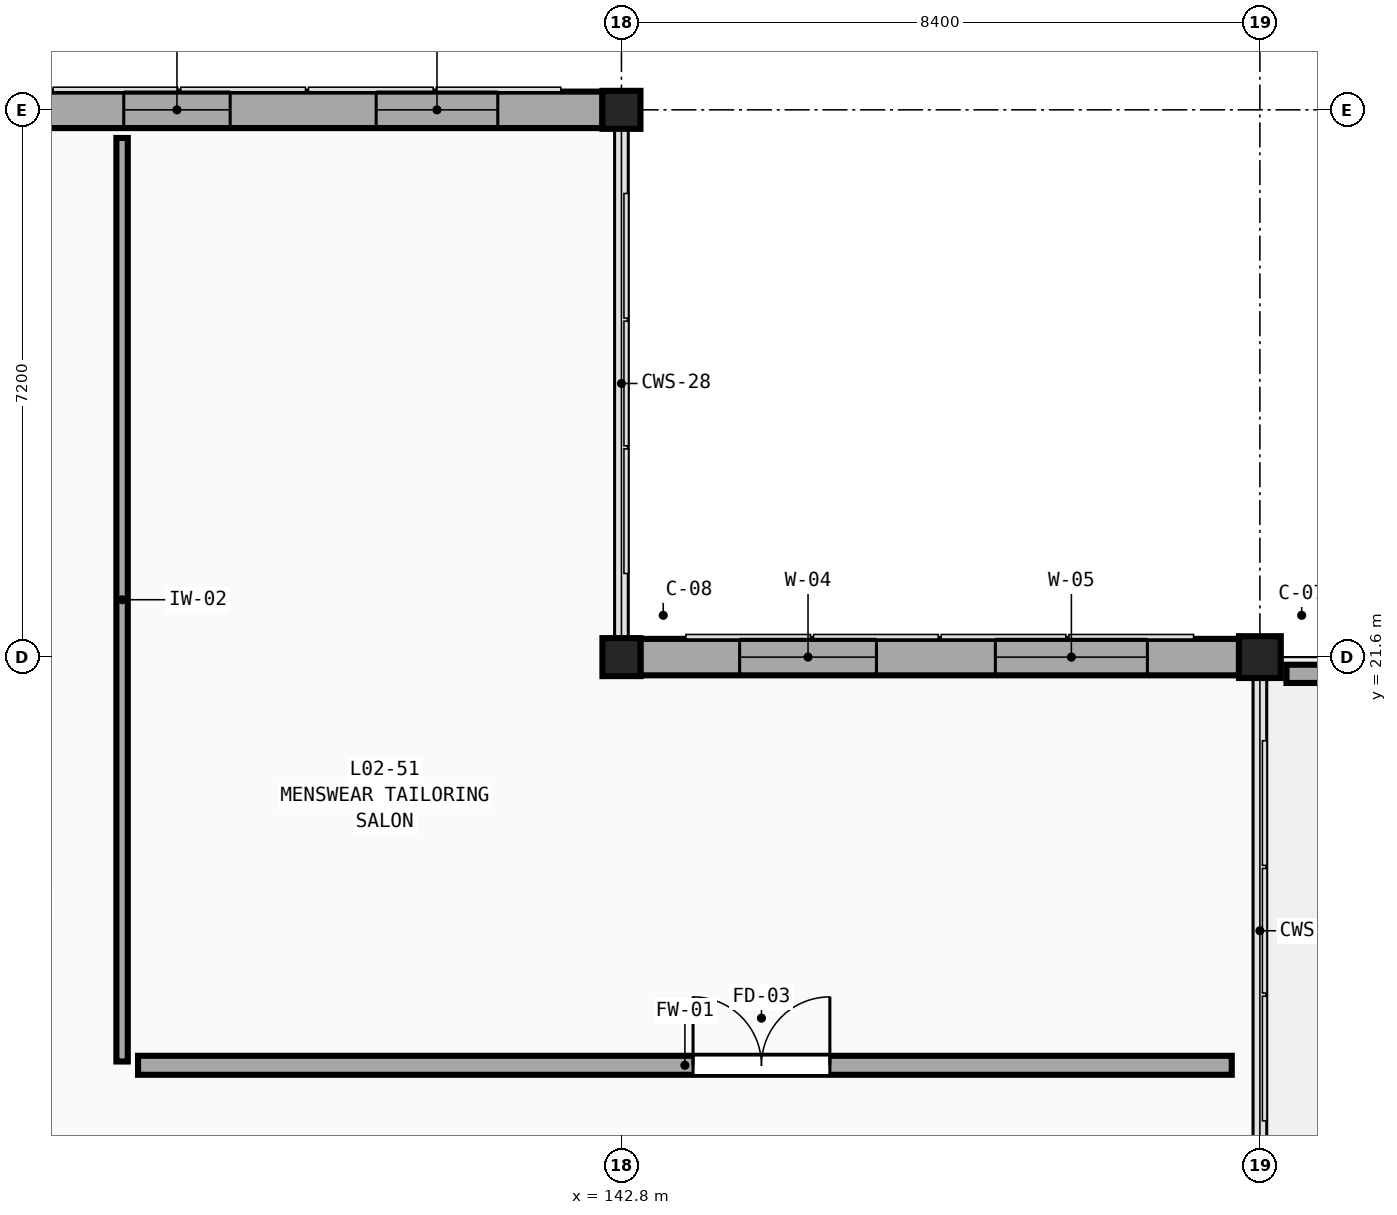
"""IFC4 building model, lengths in metres.
Left out: names, types, materials, properties, quantities, classifications, styles, units other than length and angle.
Written with IfcOpenShell. Run it as: python <this file> out.ifc"""

import sys

from ifc_helpers import new_model, si_unit, direction, frame, frame_2d, origin, origin_2d, place, context, subcontext, project, spatial, rectangle, extrude, element, fill, save


model = new_model("IFC4")
c1 = context("Model", 3, precision=1e-05, world=origin(), true_north=direction((0.0, 1.0)))
c2 = subcontext(c1, "Body", "Model", "MODEL_VIEW")
j1 = project(units=[si_unit("LENGTHUNIT", "METRE"), si_unit("PLANEANGLEUNIT", "RADIAN")], contexts=[c1])
p1 = place(None, origin())
s1 = spatial("IfcSite", under=j1, at=p1, CompositionType="ELEMENT")
p2 = place(p1, origin())
s2 = spatial("IfcBuilding", under=s1, at=p2, CompositionType="ELEMENT")
p3 = place(p2, frame((0.0, 0.0, 9.9)))
s3 = spatial("IfcBuildingStorey", under=s2, at=p3, CompositionType="ELEMENT", Elevation=9.9)
for number, where, z_axis, x_axis in (
    (1, (142.8, 21.6, 0.0), (0.0, 0.0, 1.0), (1.0, 0.0, 0.0)),
    (2, (142.8, 28.8, 0.0), (0.0, 0.0, 1.0), (1.0, 0.0, 0.0)),
):
    element("IfcColumn", number, at=place(p3, frame(where, z_axis=z_axis, x_axis=x_axis)), inside=s3, PredefinedType="COLUMN", context=c2, shape_type="SweptSolid", body=[
        extrude(rectangle(XDim=0.5, YDim=0.5, at=origin_2d()), origin(), (0.0, 0.0, 1.0), 4.5),
    ])
p4 = place(p3, frame((151.2, 21.6, 0.0), z_axis=(0.0, 0.0, 1.0), x_axis=(1.0, 0.0, 0.0)))
e3 = element("IfcColumn", 3, at=p4, inside=s3, PredefinedType="COLUMN", context=c2, shape_type="SweptSolid", body=[
    extrude(rectangle(XDim=0.55, YDim=0.55, at=origin_2d()), origin(), (0.0, 0.0, 1.0), 4.5),
])
p5 = place(p3, frame((134.775, 28.8, 0.0), z_axis=(0.0, 0.0, 1.0), x_axis=(1.0, 0.0, 0.0)))
e4 = element("IfcWall", 4, at=p5, inside=s3, PredefinedType="SOLIDWALL", context=c2, shape_type="SweptSolid", body=[
    extrude(rectangle(XDim=7.775, YDim=0.48, at=frame_2d((3.888, 0.0))), origin(), (0.0, 0.0, 1.0), 3.63),
])
p6 = place(p5, frame((1.477, 0.0, 0.75)))
e5 = element("IfcOpeningElement", 5, at=p6, cuts=e4, PredefinedType="OPENING", context=c2, shape_type="SweptSolid", body=[
    extrude(rectangle(XDim=1.4, YDim=1.9, at=frame_2d((0.7, 0.95))), frame((0.0, 0.26, 0.0), z_axis=(0.0, -1.0, 0.0), x_axis=(1.0, 0.0, 0.0)), (0.0, 0.0, 1.0), 0.52),
])
p7 = place(p5, frame((4.798, 0.0, 0.75)))
e6 = element("IfcOpeningElement", 6, at=p7, cuts=e4, PredefinedType="OPENING", context=c2, shape_type="SweptSolid", body=[
    extrude(rectangle(XDim=1.6, YDim=1.9, at=frame_2d((0.8, 0.95))), frame((0.0, 0.26, 0.0), z_axis=(0.0, -1.0, 0.0), x_axis=(1.0, 0.0, 0.0)), (0.0, 0.0, 1.0), 0.52),
])
p8 = place(p3, frame((143.05, 21.6, 0.0), z_axis=(0.0, 0.0, 1.0), x_axis=(1.0, 0.0, 0.0)))
e7 = element("IfcWall", 7, at=p8, inside=s3, PredefinedType="SOLIDWALL", context=c2, shape_type="SweptSolid", body=[
    extrude(rectangle(XDim=7.875, YDim=0.48, at=frame_2d((3.938, 0.0))), origin(), (0.0, 0.0, 1.0), 3.63),
])
p9 = place(p8, frame((1.305, 0.0, 0.75)))
e8 = element("IfcOpeningElement", 8, at=p9, cuts=e7, PredefinedType="OPENING", context=c2, shape_type="SweptSolid", body=[
    extrude(rectangle(XDim=1.8, YDim=1.9, at=frame_2d((0.9, 0.95))), frame((0.0, 0.26, 0.0), z_axis=(0.0, -1.0, 0.0), x_axis=(1.0, 0.0, 0.0)), (0.0, 0.0, 1.0), 0.52),
])
p10 = place(p8, frame((4.67, 0.0, 0.75)))
e9 = element("IfcOpeningElement", 9, at=p10, cuts=e7, PredefinedType="OPENING", context=c2, shape_type="SweptSolid", body=[
    extrude(rectangle(XDim=2.0, YDim=1.9, at=frame_2d((1.0, 0.95))), frame((0.0, 0.26, 0.0), z_axis=(0.0, -1.0, 0.0), x_axis=(1.0, 0.0, 0.0)), (0.0, 0.0, 1.0), 0.52),
])
p11 = place(p3, frame((151.55, 21.38, 0.0), z_axis=(0.0, 0.0, 1.0), x_axis=(1.0, 0.0, 0.0)))
e10 = element("IfcWall", 10, at=p11, inside=s3, PredefinedType="PARAPET", context=c2, shape_type="SweptSolid", body=[
    extrude(rectangle(XDim=16.1, YDim=0.24, at=frame_2d((8.05, 0.0))), origin(), (0.0, 0.0, 1.0), 1.15),
])
p12 = place(p3, frame((136.44, 16.23, 0.0), z_axis=(0.0, 0.0, 1.0), x_axis=(1.0, 0.0, 0.0)))
e11 = element("IfcWall", 11, at=p12, inside=s3, PredefinedType="SOLIDWALL", context=c2, shape_type="SweptSolid", body=[
    extrude(rectangle(XDim=14.39, YDim=0.25, at=frame_2d((7.195, 0.0))), origin(), (0.0, 0.0, 1.0), 4.18),
])
p13 = place(p12, frame((7.302, 0.0, 0.0)))
e12 = element("IfcOpeningElement", 12, at=p13, cuts=e11, PredefinedType="OPENING", context=c2, shape_type="SweptSolid", body=[
    extrude(rectangle(XDim=1.8, YDim=2.3, at=frame_2d((0.9, 1.15))), frame((0.0, 0.145, 0.0), z_axis=(0.0, -1.0, 0.0), x_axis=(1.0, 0.0, 0.0)), (0.0, 0.0, 1.0), 0.29),
])
p14 = place(p3, frame((136.23, 16.28, 0.0), z_axis=(0.0, 0.0, 1.0), x_axis=(0.0, 1.0, 0.0)))
e13 = element("IfcWall", 13, at=p14, inside=s3, PredefinedType="PARTITIONING", context=c2, shape_type="SweptSolid", body=[
    extrude(rectangle(XDim=12.15, YDim=0.15, at=frame_2d((6.075, 0.0))), origin(), (0.0, 0.0, 1.0), 4.18),
])
p15 = place(p6, origin())
e14 = element("IfcWindow", 14, at=p15, inside=s3, PartitioningType="DOUBLE_PANEL_VERTICAL", PredefinedType="WINDOW", context=c2, shape_type="SweptSolid", body=[
    extrude(rectangle(XDim=1.4, YDim=1.9, at=frame_2d((0.7, 0.95))), frame((0.0, 0.03, 0.0), z_axis=(0.0, -1.0, 0.0), x_axis=(1.0, 0.0, 0.0)), (0.0, 0.0, 1.0), 0.06),
])
fill(e5, e14)
p16 = place(p7, origin())
e15 = element("IfcWindow", 15, at=p16, inside=s3, PartitioningType="DOUBLE_PANEL_VERTICAL", PredefinedType="WINDOW", context=c2, shape_type="SweptSolid", body=[
    extrude(rectangle(XDim=1.6, YDim=1.9, at=frame_2d((0.8, 0.95))), frame((0.0, 0.03, 0.0), z_axis=(0.0, -1.0, 0.0), x_axis=(1.0, 0.0, 0.0)), (0.0, 0.0, 1.0), 0.06),
])
fill(e6, e15)
p17 = place(p9, origin())
e16 = element("IfcWindow", 16, at=p17, inside=s3, PartitioningType="DOUBLE_PANEL_VERTICAL", PredefinedType="WINDOW", context=c2, shape_type="SweptSolid", body=[
    extrude(rectangle(XDim=1.8, YDim=1.9, at=frame_2d((0.9, 0.95))), frame((0.0, 0.03, 0.0), z_axis=(0.0, -1.0, 0.0), x_axis=(1.0, 0.0, 0.0)), (0.0, 0.0, 1.0), 0.06),
])
fill(e8, e16)
p18 = place(p10, origin())
e17 = element("IfcWindow", 17, at=p18, inside=s3, PartitioningType="TRIPLE_PANEL_VERTICAL", PredefinedType="WINDOW", context=c2, shape_type="SweptSolid", body=[
    extrude(rectangle(XDim=2.0, YDim=1.9, at=frame_2d((1.0, 0.95))), frame((0.0, 0.03, 0.0), z_axis=(0.0, -1.0, 0.0), x_axis=(1.0, 0.0, 0.0)), (0.0, 0.0, 1.0), 0.06),
])
fill(e9, e17)
p19 = place(p13, origin())
e18 = element("IfcDoor", 18, at=p19, inside=s3, OperationType="DOUBLE_DOOR_SINGLE_SWING", PredefinedType="DOOR", context=c2, shape_type="SweptSolid", body=[
    extrude(rectangle(XDim=1.8, YDim=2.3, at=frame_2d((0.9, 1.15))), frame((0.0, 0.025, 0.0), z_axis=(0.0, -1.0, 0.0), x_axis=(1.0, 0.0, 0.0)), (0.0, 0.0, 1.0), 0.05),
])
fill(e12, e18)
save(model, sys.argv[1])
